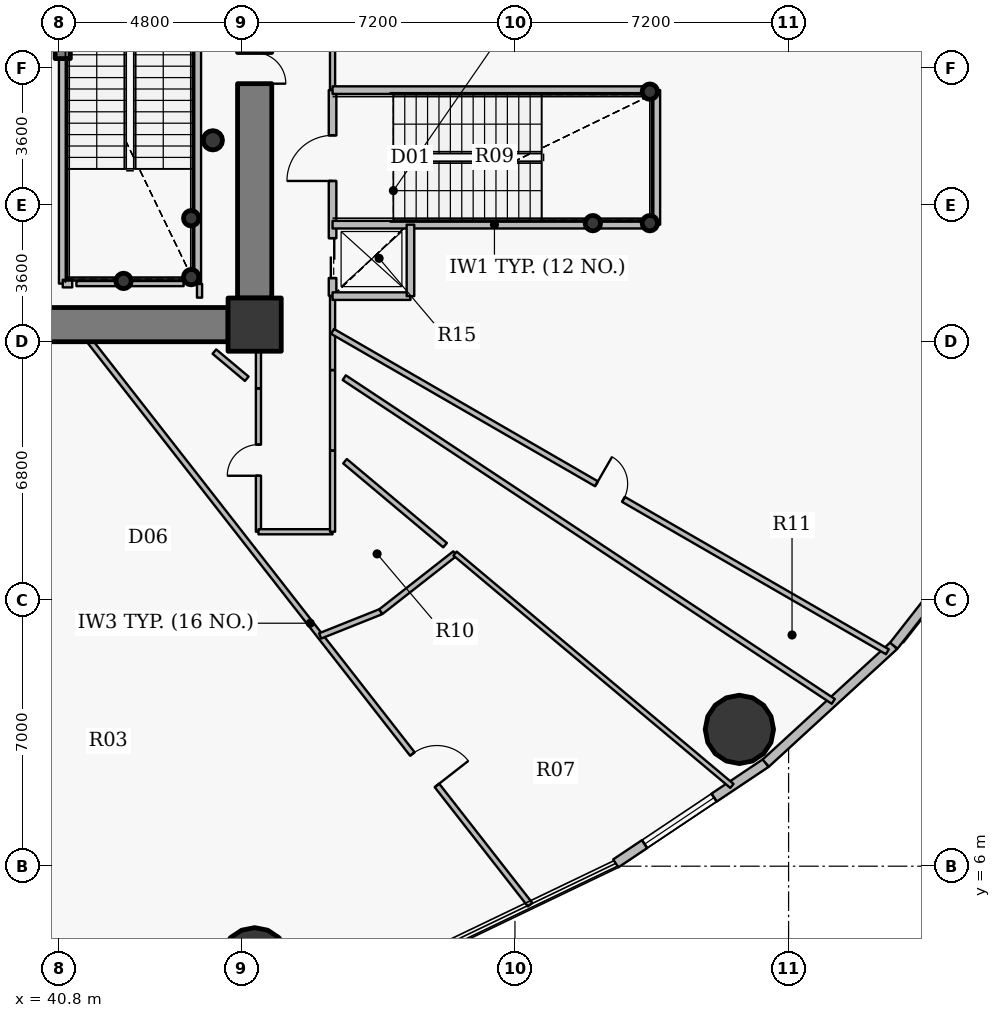
"""IFC4 building model, lengths in metres.
Left out: names, types, materials, properties, quantities, classifications, styles, units other than length and angle.
Written with IfcOpenShell. Run it as: python <this file> out.ifc"""

import sys

from ifc_helpers import new_model, si_unit, direction, frame, frame_2d, origin, origin_2d, place, context, subcontext, project, spatial, rectangle, hollow_circle, extrude, source, transform, mapped, element, fill, save


model = new_model("IFC4")
c1 = context("Model", 3, precision=1e-05, world=origin(), true_north=direction((0.0, 1.0)))
c2 = subcontext(c1, "Body", "Model", "MODEL_VIEW")
j1 = project(units=[si_unit("LENGTHUNIT", "METRE"), si_unit("PLANEANGLEUNIT", "RADIAN")], contexts=[c1])
p1 = place(None, origin())
s1 = spatial("IfcSite", under=j1, at=p1, CompositionType="ELEMENT")
p2 = place(p1, origin())
s2 = spatial("IfcBuilding", under=s1, at=p2, CompositionType="ELEMENT")
p3 = place(p2, frame((0.0, 0.0, 22.8)))
s3 = spatial("IfcBuildingStorey", under=s2, at=p3, CompositionType="ELEMENT", Elevation=22.8)
p4 = place(p3, frame((45.95, 20.25, 0.0), z_axis=(0.0, 0.0, 1.0), x_axis=(1.0, 0.0, 0.0)))
e1 = element("IfcColumn", 1, at=p4, inside=s3, PredefinedType="COLUMN", context=c2, shape_type="SweptSolid", body=[
    extrude(rectangle(XDim=1.4, YDim=1.4, at=origin_2d()), origin(), (0.0, 0.0, 1.0), 4.2),
])
for number, where, z_axis, x_axis in (
    (2, (44.28, 21.5, 0.0), (0.0, 0.0, 1.0), (1.0, 0.0, 0.0)),
    (3, (44.28, 23.05, 0.0), (0.0, 0.0, 1.0), (1.0, 0.0, 0.0)),
    (4, (42.5, 21.4, 0.0), (0.0, 0.0, 1.0), (1.0, 0.0, 0.0)),
    (5, (56.35, 26.38, 0.0), (0.0, 0.0, 1.0), (1.0, 0.0, 0.0)),
    (6, (56.35, 22.92, 0.0), (0.0, 0.0, 1.0), (1.0, 0.0, 0.0)),
    (7, (54.85, 22.92, 0.0), (0.0, 0.0, 1.0), (1.0, 0.0, 0.0)),
):
    element("IfcColumn", number, at=place(p3, frame(where, z_axis=z_axis, x_axis=x_axis)), inside=s3, PredefinedType="COLUMN", context=c2, shape_type="SweptSolid", body=[
        extrude(hollow_circle(Radius=0.203, WallThickness=0.016, at=origin_2d()), origin(), (0.0, 0.0, 1.0), 4.2),
    ])
p5 = place(p3, frame((45.95, 33.05, 0.0), z_axis=(0.0, 0.0, 1.0), x_axis=(0.0, -1.0, 0.0)))
e8 = element("IfcWall", 8, at=p5, inside=s3, PredefinedType="SHEAR", context=c2, shape_type="SweptSolid", body=[
    extrude(rectangle(XDim=12.1, YDim=0.9, at=frame_2d((6.05, 0.0))), origin(), (0.0, 0.0, 1.0), 3.35),
])
p6 = place(p5, frame((5.64, 0.0, 0.0)))
e9 = element("IfcOpeningElement", 9, at=p6, cuts=e8, PredefinedType="OPENING", context=c2, shape_type="SweptSolid", body=[
    extrude(rectangle(XDim=0.82, YDim=2.1, at=origin_2d()), frame((0.41, 0.46, 1.05), z_axis=(0.0, -1.0, 0.0), x_axis=(1.0, 0.0, 0.0)), (0.0, 0.0, 1.0), 0.92),
])
p7 = place(p3, frame((45.25, 20.25, 0.0), z_axis=(0.0, 0.0, 1.0), x_axis=(-1.0, 0.0, 0.0)))
e10 = element("IfcWall", 10, at=p7, inside=s3, PredefinedType="SHEAR", context=c2, shape_type="SweptSolid", body=[
    extrude(rectangle(XDim=18.5, YDim=0.9, at=frame_2d((9.25, 0.0))), origin(), (0.0, 0.0, 1.0), 3.35),
])
p8 = place(p7, frame((10.0, 0.0, 0.0)))
e11 = element("IfcOpeningElement", 11, at=p8, cuts=e10, PredefinedType="OPENING", context=c2, shape_type="SweptSolid", body=[
    extrude(rectangle(XDim=1.15, YDim=2.15, at=origin_2d()), frame((0.575, 0.46, 1.075), z_axis=(0.0, -1.0, 0.0), x_axis=(1.0, 0.0, 0.0)), (0.0, 0.0, 1.0), 0.92),
])
p9 = place(p3, frame((40.9, 27.25, 0.0), z_axis=(0.0, 0.0, 1.0), x_axis=(0.0, 1.0, 0.0)))
e12 = element("IfcWall", 12, at=p9, inside=s3, PredefinedType="SHEAR", context=c2, shape_type="SweptSolid", body=[
    extrude(rectangle(XDim=2.6, YDim=0.4, at=frame_2d((1.3, 0.0))), origin(), (0.0, 0.0, 1.0), 3.5),
])
for number, where, z_axis, x_axis in (
    (13, (45.951, 3.484, 0.0), (0.0, 0.0, 1.0), (1.0, 0.0, 0.0)),
    (14, (58.705, 9.599, 0.0), (0.0, 0.0, 1.0), (1.0, 0.0, 0.0)),
):
    element("IfcColumn", number, at=place(p3, frame(where, z_axis=z_axis, x_axis=x_axis)), inside=s3, PredefinedType="COLUMN", context=c2, shape_type="SweptSolid", body=[
        extrude(hollow_circle(Radius=0.9, WallThickness=0.05, at=origin_2d()), origin(), (0.0, 0.0, 1.0), 4.2),
    ])
p10 = place(p3, frame((44.85, 25.1, 0.0), z_axis=(0.0, 0.0, 1.0), x_axis=(1.0, 0.0, 0.0)))
e15 = element("IfcColumn", 15, at=p10, inside=s3, PredefinedType="COLUMN", context=c2, shape_type="SweptSolid", body=[
    extrude(hollow_circle(Radius=0.254, WallThickness=0.02, at=origin_2d()), origin(), (0.0, 0.0, 1.0), 4.2),
])
p11 = place(p3, frame((59.399, 8.714, 0.0), z_axis=(0.0, 0.0, 1.0), x_axis=(-0.831218664812, -0.555945618985, 0.0)))
e16 = element("IfcWall", 16, at=p11, inside=s3, PredefinedType="SOLIDWALL", context=c2, shape_type="SweptSolid", body=[
    extrude(rectangle(XDim=4.748, YDim=0.25, at=frame_2d((2.374, 0.0))), origin(), (0.0, 0.0, 1.0), 3.9),
])
p12 = place(p11, frame((1.635, 0.0, 0.9)))
e17 = element("IfcOpeningElement", 17, at=p12, cuts=e16, PredefinedType="OPENING", context=c2, shape_type="SweptSolid", body=[
    extrude(rectangle(XDim=2.2, YDim=2.0, at=origin_2d()), frame((1.1, 0.135, 1.0), z_axis=(0.0, -1.0, 0.0), x_axis=(1.0, 0.0, 0.0)), (0.0, 0.0, 1.0), 0.27),
])
p13 = place(p3, frame((62.768, 11.802, 0.0), z_axis=(0.0, 0.0, 1.0), x_axis=(-0.737076532105, -0.675809282136, 0.0)))
e18 = element("IfcWall", 18, at=p13, inside=s3, PredefinedType="SOLIDWALL", context=c2, shape_type="SweptSolid", body=[
    extrude(rectangle(XDim=4.571, YDim=0.25, at=frame_2d((2.285, 0.0))), origin(), (0.0, 0.0, 1.0), 3.9),
])
p14 = place(p3, frame((65.477, 15.264, 0.0), z_axis=(0.0, 0.0, 1.0), x_axis=(-0.61622589112, -0.787569457961, 0.0)))
e19 = element("IfcWall", 19, at=p14, inside=s3, PredefinedType="SOLIDWALL", context=c2, shape_type="SweptSolid", body=[
    extrude(rectangle(XDim=4.396, YDim=0.25, at=frame_2d((2.198, 0.0))), origin(), (0.0, 0.0, 1.0), 3.9),
])
p15 = place(p3, frame((40.9, 21.33, 0.0), z_axis=(0.0, 0.0, 1.0), x_axis=(0.0, 1.0, 0.0)))
e20 = element("IfcWall", 20, at=p15, inside=s3, PredefinedType="PARTITIONING", context=c2, shape_type="SweptSolid", body=[
    extrude(rectangle(XDim=5.91, YDim=0.2, at=frame_2d((2.955, 0.0))), origin(), (0.0, 0.0, 1.0), 3.435),
])
p16 = place(p3, frame((40.9, 21.33, 0.0), z_axis=(0.0, 0.0, 1.0), x_axis=(1.0, 0.0, 0.0)))
e21 = element("IfcWall", 21, at=p16, inside=s3, PredefinedType="PARTITIONING", context=c2, shape_type="SweptSolid", body=[
    extrude(rectangle(XDim=0.25, YDim=0.2, at=frame_2d((0.125, 0.0))), origin(), (0.0, 0.0, 1.0), 3.435),
])
p17 = place(p3, frame((41.625, 19.8, 0.0), z_axis=(0.0, 0.0, 1.0), x_axis=(0.615657399511, -0.788013937965, 0.0)))
e22 = element("IfcWall", 22, at=p17, inside=s3, PredefinedType="PARTITIONING", context=c2, shape_type="SweptSolid", body=[
    extrude(rectangle(XDim=18.798, YDim=0.15, at=frame_2d((9.399, 0.0))), origin(), (0.0, 0.0, 1.0), 3.085),
])
p18 = place(p17, frame((13.765, 0.0, 0.0)))
e23 = element("IfcOpeningElement", 23, at=p18, cuts=e22, PredefinedType="OPENING", context=c2, shape_type="SweptSolid", body=[
    extrude(rectangle(XDim=1.05, YDim=2.15, at=origin_2d()), frame((0.525, 0.085, 1.075), z_axis=(0.0, -1.0, 0.0), x_axis=(1.0, 0.0, 0.0)), (0.0, 0.0, 1.0), 0.17),
])
p19 = place(p3, frame((44.44, 21.33, 0.0), z_axis=(0.0, 0.0, 1.0), x_axis=(0.0, 1.0, 0.0)))
e24 = element("IfcWall", 24, at=p19, inside=s3, PredefinedType="PARTITIONING", context=c2, shape_type="SweptSolid", body=[
    extrude(rectangle(XDim=8.52, YDim=0.2, at=frame_2d((4.26, 0.0))), origin(), (0.0, 0.0, 1.0), 3.9),
])
p20 = place(p3, frame((46.05, 14.8, 0.0), z_axis=(0.0, 0.0, 1.0), x_axis=(0.0, 1.0, 0.0)))
e25 = element("IfcWall", 25, at=p20, inside=s3, PredefinedType="PARTITIONING", context=c2, shape_type="SweptSolid", body=[
    extrude(rectangle(XDim=3.767, YDim=0.135, at=frame_2d((1.884, 0.0))), origin(), (0.0, 0.0, 1.0), 3.9),
])
p21 = place(p20, frame((1.473, 0.0, 0.0)))
e26 = element("IfcOpeningElement", 26, at=p21, cuts=e25, PredefinedType="OPENING", context=c2, shape_type="SweptSolid", body=[
    extrude(rectangle(XDim=0.82, YDim=2.1, at=origin_2d()), frame((0.41, 0.078, 1.05), z_axis=(0.0, -1.0, 0.0), x_axis=(1.0, 0.0, 0.0)), (0.0, 0.0, 1.0), 0.155),
])
p22 = place(p3, frame((46.05, 14.8, 0.0), z_axis=(0.0, 0.0, 1.0), x_axis=(1.0, 0.0, 0.0)))
e27 = element("IfcWall", 27, at=p22, inside=s3, PredefinedType="PARTITIONING", context=c2, shape_type="SweptSolid", body=[
    extrude(rectangle(XDim=1.95, YDim=0.135, at=frame_2d((0.975, 0.0))), origin(), (0.0, 0.0, 1.0), 3.9),
])
p23 = place(p3, frame((47.673, 12.059, 0.0), z_axis=(0.0, 0.0, 1.0), x_axis=(0.928789728794, 0.370607123093, 0.0)))
e28 = element("IfcWall", 28, at=p23, inside=s3, PredefinedType="PARTITIONING", context=c2, shape_type="SweptSolid", body=[
    extrude(rectangle(XDim=1.719, YDim=0.15, at=frame_2d((0.86, 0.0))), origin(), (0.0, 0.0, 1.0), 3.9),
])
p24 = place(p3, frame((48.0, 14.8, 0.0), z_axis=(0.0, 0.0, 1.0), x_axis=(0.0, 1.0, 0.0)))
e29 = element("IfcWall", 29, at=p24, inside=s3, PredefinedType="PARTITIONING", context=c2, shape_type="SweptSolid", body=[
    extrude(rectangle(XDim=2.131, YDim=0.135, at=frame_2d((1.065, 0.0))), origin(), (0.0, 0.0, 1.0), 3.9),
])
p25 = place(p3, frame((48.0, 19.057, 0.0), z_axis=(0.0, 0.0, 1.0), x_axis=(0.0, 1.0, 0.0)))
e30 = element("IfcWall", 30, at=p25, inside=s3, PredefinedType="PARTITIONING", context=c2, shape_type="SweptSolid", body=[
    extrude(rectangle(XDim=1.943, YDim=0.135, at=frame_2d((0.971, 0.0))), origin(), (0.0, 0.0, 1.0), 3.9),
])
p26 = place(p3, frame((48.0, 20.072, 0.0), z_axis=(0.0, 0.0, 1.0), x_axis=(0.866027147936, -0.499996979028, 0.0)))
e31 = element("IfcWall", 31, at=p26, inside=s3, PredefinedType="PARTITIONING", context=c2, shape_type="SweptSolid", body=[
    extrude(rectangle(XDim=16.859, YDim=0.15, at=frame_2d((8.429, 0.0))), origin(), (0.0, 0.0, 1.0), 3.085),
])
p27 = place(p26, frame((8.02, 0.0, 0.0)))
e32 = element("IfcOpeningElement", 32, at=p27, cuts=e31, PredefinedType="OPENING", context=c2, shape_type="SweptSolid", body=[
    extrude(rectangle(XDim=0.82, YDim=2.1, at=origin_2d()), frame((0.41, 0.085, 1.05), z_axis=(0.0, -1.0, 0.0), x_axis=(1.0, 0.0, 0.0)), (0.0, 0.0, 1.0), 0.17),
])
p28 = place(p3, frame((48.0, 21.01, 0.0), z_axis=(0.0, 0.0, 1.0), x_axis=(0.0, 1.0, 0.0)))
e33 = element("IfcWall", 33, at=p28, inside=s3, PredefinedType="PARTITIONING", context=c2, shape_type="SweptSolid", body=[
    extrude(rectangle(XDim=5.41, YDim=0.2, at=frame_2d((2.705, 0.0))), origin(), (0.0, 0.0, 1.0), 2.685),
])
p29 = place(p28, frame((3.02, 0.0, 0.0)))
e34 = element("IfcOpeningElement", 34, at=p29, cuts=e33, PredefinedType="OPENING", context=c2, shape_type="SweptSolid", body=[
    extrude(rectangle(XDim=1.2, YDim=2.15, at=origin_2d()), frame((0.6, 0.11, 1.075), z_axis=(0.0, -1.0, 0.0), x_axis=(1.0, 0.0, 0.0)), (0.0, 0.0, 1.0), 0.22),
])
p30 = place(p28, frame((0.465, 0.0, 0.0)))
e35 = element("IfcOpeningElement", 35, at=p30, cuts=e33, PredefinedType="OPENING", context=c2, shape_type="SweptSolid", body=[
    extrude(rectangle(XDim=1.05, YDim=2.15, at=origin_2d()), frame((0.525, 0.11, 1.075), z_axis=(0.0, -1.0, 0.0), x_axis=(1.0, 0.0, 0.0)), (0.0, 0.0, 1.0), 0.22),
])
p31 = place(p3, frame((48.0, 21.0, 0.0), z_axis=(0.0, 0.0, 1.0), x_axis=(1.0, 0.0, 0.0)))
e36 = element("IfcWall", 36, at=p31, inside=s3, PredefinedType="PARTITIONING", context=c2, shape_type="SweptSolid", body=[
    extrude(rectangle(XDim=2.05, YDim=0.2, at=frame_2d((1.025, 0.0))), origin(), (0.0, 0.0, 1.0), 3.9),
])
p32 = place(p3, frame((48.0, 22.88, 0.0), z_axis=(0.0, 0.0, 1.0), x_axis=(1.0, 0.0, 0.0)))
e37 = element("IfcWall", 37, at=p32, inside=s3, PredefinedType="PARTITIONING", context=c2, shape_type="SweptSolid", body=[
    extrude(rectangle(XDim=8.52, YDim=0.2, at=frame_2d((4.26, 0.0))), origin(), (0.0, 0.0, 1.0), 3.9),
])
p33 = place(p3, frame((48.0, 26.43, 0.0), z_axis=(0.0, 0.0, 1.0), x_axis=(0.0, 1.0, 0.0)))
e38 = element("IfcWall", 38, at=p33, inside=s3, PredefinedType="PARTITIONING", context=c2, shape_type="SweptSolid", body=[
    extrude(rectangle(XDim=14.77, YDim=0.135, at=frame_2d((7.385, 0.0))), origin(), (0.0, 0.0, 1.0), 2.685),
])
p34 = place(p33, frame((6.86, 0.0, 0.0)))
e39 = element("IfcOpeningElement", 39, at=p34, cuts=e38, PredefinedType="OPENING", context=c2, shape_type="SweptSolid", body=[
    extrude(rectangle(XDim=1.05, YDim=2.15, at=origin_2d()), frame((0.525, 0.078, 1.075), z_axis=(0.0, -1.0, 0.0), x_axis=(1.0, 0.0, 0.0)), (0.0, 0.0, 1.0), 0.155),
])
p35 = place(p3, frame((48.0, 26.42, 0.0), z_axis=(0.0, 0.0, 1.0), x_axis=(1.0, 0.0, 0.0)))
e40 = element("IfcWall", 40, at=p35, inside=s3, PredefinedType="PARTITIONING", context=c2, shape_type="SweptSolid", body=[
    extrude(rectangle(XDim=8.52, YDim=0.2, at=frame_2d((4.26, 0.0))), origin(), (0.0, 0.0, 1.0), 3.9),
])
p36 = place(p3, frame((49.27, 12.697, 0.0), z_axis=(0.0, 0.0, 1.0), x_axis=(0.787297312988, 0.616573548704, 0.0)))
e41 = element("IfcWall", 41, at=p36, inside=s3, PredefinedType="PARTITIONING", context=c2, shape_type="SweptSolid", body=[
    extrude(rectangle(XDim=2.481, YDim=0.15, at=frame_2d((1.241, 0.0))), origin(), (0.0, 0.0, 1.0), 3.9),
])
p37 = place(p3, frame((50.05, 21.0, 0.0), z_axis=(0.0, 0.0, 1.0), x_axis=(0.0, 1.0, 0.0)))
e42 = element("IfcWall", 42, at=p37, inside=s3, PredefinedType="PARTITIONING", context=c2, shape_type="SweptSolid", body=[
    extrude(rectangle(XDim=1.88, YDim=0.2, at=frame_2d((0.94, 0.0))), origin(), (0.0, 0.0, 1.0), 2.685),
])
p38 = place(p3, frame((56.52, 22.88, 0.0), z_axis=(0.0, 0.0, 1.0), x_axis=(0.0, 1.0, 0.0)))
e43 = element("IfcWall", 43, at=p38, inside=s3, PredefinedType="PARTITIONING", context=c2, shape_type="SweptSolid", body=[
    extrude(rectangle(XDim=3.54, YDim=0.2, at=frame_2d((1.77, 0.0))), origin(), (0.0, 0.0, 1.0), 3.9),
])
p39 = place(p3, frame((44.08, 21.33, 0.0), z_axis=(0.0, 0.0, 1.0), x_axis=(-1.0, 0.0, 0.0)))
e44 = element("IfcWall", 44, at=p39, inside=s3, PredefinedType="PARTITIONING", context=c2, shape_type="SweptSolid", body=[
    extrude(rectangle(XDim=2.82, YDim=0.135, at=frame_2d((1.41, 0.0))), origin(), (0.0, 0.0, 1.0), 3.435),
])
p40 = place(p3, frame((44.5, 20.96, 0.0), z_axis=(0.0, 0.0, 1.0), x_axis=(0.0, 1.0, 0.0)))
e45 = element("IfcWall", 45, at=p40, inside=s3, PredefinedType="PARTITIONING", context=c2, shape_type="SweptSolid", body=[
    extrude(rectangle(XDim=0.36, YDim=0.135, at=frame_2d((0.18, 0.0))), origin(), (0.0, 0.0, 1.0), 3.9),
])
p41 = place(p3, frame((48.0, 19.047, 0.0), z_axis=(0.0, 0.0, 1.0), x_axis=(0.0, -1.0, 0.0)))
e46 = element("IfcWall", 46, at=p41, inside=s3, PredefinedType="PARTITIONING", context=c2, shape_type="SweptSolid", body=[
    extrude(rectangle(XDim=2.106, YDim=0.135, at=frame_2d((1.053, 0.0))), origin(), (0.0, 0.0, 1.0), 2.685),
])
p42 = place(p3, frame((46.05, 18.577, 0.0), z_axis=(0.0, 0.0, 1.0), x_axis=(0.0, 1.0, 0.0)))
e47 = element("IfcWall", 47, at=p42, inside=s3, PredefinedType="PARTITIONING", context=c2, shape_type="SweptSolid", body=[
    extrude(rectangle(XDim=1.223, YDim=0.135, at=frame_2d((0.611, 0.0))), origin(), (0.0, 0.0, 1.0), 2.685),
])
p43 = place(p3, frame((46.4, 19.8, 0.0), z_axis=(0.0, 0.0, 1.0), x_axis=(0.0, 1.0, 0.0)))
e48 = element("IfcWall", 48, at=p43, inside=s3, PredefinedType="PARTITIONING", context=c2, shape_type="SweptSolid", body=[
    extrude(rectangle(XDim=1.14, YDim=0.135, at=frame_2d((0.57, 0.0))), origin(), (0.0, 0.0, 1.0), 3.9),
])
p44 = place(p3, frame((44.89, 19.54, 0.0), z_axis=(0.0, 0.0, 1.0), x_axis=(0.76598583339, -0.642857451576, 0.0)))
e49 = element("IfcWall", 49, at=p44, inside=s3, PredefinedType="PARTITIONING", context=c2, shape_type="SweptSolid", body=[
    extrude(rectangle(XDim=1.112, YDim=0.15, at=frame_2d((0.556, 0.0))), origin(), (0.0, 0.0, 1.0), 3.9),
])
p45 = place(p3, frame((48.327, 16.656, 0.0), z_axis=(0.0, 0.0, 1.0), x_axis=(0.766057301784, -0.642772285014, 0.0)))
e50 = element("IfcWall", 50, at=p45, inside=s3, PredefinedType="PARTITIONING", context=c2, shape_type="SweptSolid", body=[
    extrude(rectangle(XDim=3.438, YDim=0.15, at=frame_2d((1.719, 0.0))), origin(), (0.0, 0.0, 1.0), 3.9),
])
p46 = place(p3, frame((51.223, 14.226, 0.0), z_axis=(0.0, 0.0, 1.0), x_axis=(0.766045572971, -0.642786263179, 0.0)))
e51 = element("IfcWall", 51, at=p46, inside=s3, PredefinedType="PARTITIONING", context=c2, shape_type="SweptSolid", body=[
    extrude(rectangle(XDim=9.511, YDim=0.135, at=frame_2d((4.756, 0.0))), origin(), (0.0, 0.0, 1.0), 3.085),
])
p47 = place(p3, frame((61.176, 10.336, 0.0), z_axis=(0.0, 0.0, 1.0), x_axis=(-0.833888196147, 0.551933398452, 0.0)))
e52 = element("IfcWall", 52, at=p47, inside=s3, PredefinedType="PARTITIONING", context=c2, shape_type="SweptSolid", body=[
    extrude(rectangle(XDim=15.432, YDim=0.15, at=frame_2d((7.716, 0.0))), origin(), (0.0, 0.0, 1.0), 3.085),
])
m1 = source(origin(), c2, "Body", "SweptSolid", [
    extrude(rectangle(XDim=2.2, YDim=2.0, at=origin_2d()), frame((1.1, 0.03, 1.0), z_axis=(0.0, -1.0, 0.0), x_axis=(1.0, 0.0, 0.0)), (0.0, 0.0, 1.0), 0.06),
])
p48 = place(p12, origin())
e53 = element("IfcWindow", 53, at=p48, inside=s3, PartitioningType="TRIPLE_PANEL_VERTICAL", PredefinedType="WINDOW", context=c2, shape_type="MappedRepresentation", body=[
    mapped(m1, transform((0.0, 0.0, 0.0), x_axis=(1.0, 0.0, 0.0), y_axis=(0.0, 1.0, 0.0), z_axis=(0.0, 0.0, 1.0), scale=1.0)),
])
fill(e17, e53)
m2 = source(origin(), c2, "Body", "SweptSolid", [
    extrude(rectangle(XDim=0.82, YDim=2.1, at=origin_2d()), frame((0.41, 0.025, 1.05), z_axis=(0.0, -1.0, 0.0), x_axis=(1.0, 0.0, 0.0)), (0.0, 0.0, 1.0), 0.05),
])
p49 = place(p6, origin())
e54 = element("IfcDoor", 54, at=p49, inside=s3, OperationType="SINGLE_SWING_RIGHT", PredefinedType="DOOR", context=c2, shape_type="MappedRepresentation", body=[
    mapped(m2, transform((0.0, 0.0, 0.0), x_axis=(1.0, 0.0, 0.0), y_axis=(0.0, 1.0, 0.0), z_axis=(0.0, 0.0, 1.0), scale=1.0)),
])
fill(e9, e54)
m3 = source(origin(), c2, "Body", "SweptSolid", [
    extrude(rectangle(XDim=1.2, YDim=2.15, at=origin_2d()), frame((0.6, 0.025, 1.075), z_axis=(0.0, -1.0, 0.0), x_axis=(1.0, 0.0, 0.0)), (0.0, 0.0, 1.0), 0.05),
])
p50 = place(p29, origin())
e55 = element("IfcDoor", 55, at=p50, inside=s3, OperationType="SINGLE_SWING_LEFT", PredefinedType="DOOR", context=c2, shape_type="MappedRepresentation", body=[
    mapped(m3, transform((0.0, 0.0, 0.0), x_axis=(1.0, 0.0, 0.0), y_axis=(0.0, 1.0, 0.0), z_axis=(0.0, 0.0, 1.0), scale=1.0)),
])
fill(e34, e55)
m4 = source(origin(), c2, "Body", "SweptSolid", [
    extrude(rectangle(XDim=1.05, YDim=2.15, at=origin_2d()), frame((0.525, 0.025, 1.075), z_axis=(0.0, -1.0, 0.0), x_axis=(1.0, 0.0, 0.0)), (0.0, 0.0, 1.0), 0.05),
])
p51 = place(p30, origin())
e56 = element("IfcDoor", 56, at=p51, inside=s3, OperationType="DOUBLE_DOOR_SLIDING", PredefinedType="USERDEFINED", context=c2, shape_type="MappedRepresentation", body=[
    mapped(m4, transform((0.0, 0.0, 0.0), x_axis=(1.0, 0.0, 0.0), y_axis=(0.0, 1.0, 0.0), z_axis=(0.0, 0.0, 1.0), scale=1.0)),
])
fill(e35, e56)
p52 = place(p21, origin())
e57 = element("IfcDoor", 57, at=p52, inside=s3, OperationType="SINGLE_SWING_LEFT", PredefinedType="DOOR", context=c2, shape_type="MappedRepresentation", body=[
    mapped(m2, transform((0.0, 0.0, 0.0), x_axis=(1.0, 0.0, 0.0), y_axis=(0.0, 1.0, 0.0), z_axis=(0.0, 0.0, 1.0), scale=1.0)),
])
fill(e26, e57)
m5 = source(origin(), c2, "Body", "SweptSolid", [
    extrude(rectangle(XDim=1.05, YDim=2.15, at=origin_2d()), frame((0.525, 0.025, 1.075), z_axis=(0.0, -1.0, 0.0), x_axis=(1.0, 0.0, 0.0)), (0.0, 0.0, 1.0), 0.05),
])
p53 = place(p18, origin())
e58 = element("IfcDoor", 58, at=p53, inside=s3, OperationType="SINGLE_SWING_RIGHT", PredefinedType="DOOR", context=c2, shape_type="MappedRepresentation", body=[
    mapped(m5, transform((0.0, 0.0, 0.0), x_axis=(1.0, 0.0, 0.0), y_axis=(0.0, 1.0, 0.0), z_axis=(0.0, 0.0, 1.0), scale=1.0)),
])
fill(e23, e58)
p54 = place(p27, origin())
e59 = element("IfcDoor", 59, at=p54, inside=s3, OperationType="SINGLE_SWING_LEFT", PredefinedType="DOOR", context=c2, shape_type="MappedRepresentation", body=[
    mapped(m2, transform((0.0, 0.0, 0.0), x_axis=(1.0, 0.0, 0.0), y_axis=(0.0, 1.0, 0.0), z_axis=(0.0, 0.0, 1.0), scale=1.0)),
])
fill(e32, e59)
save(model, sys.argv[1])
